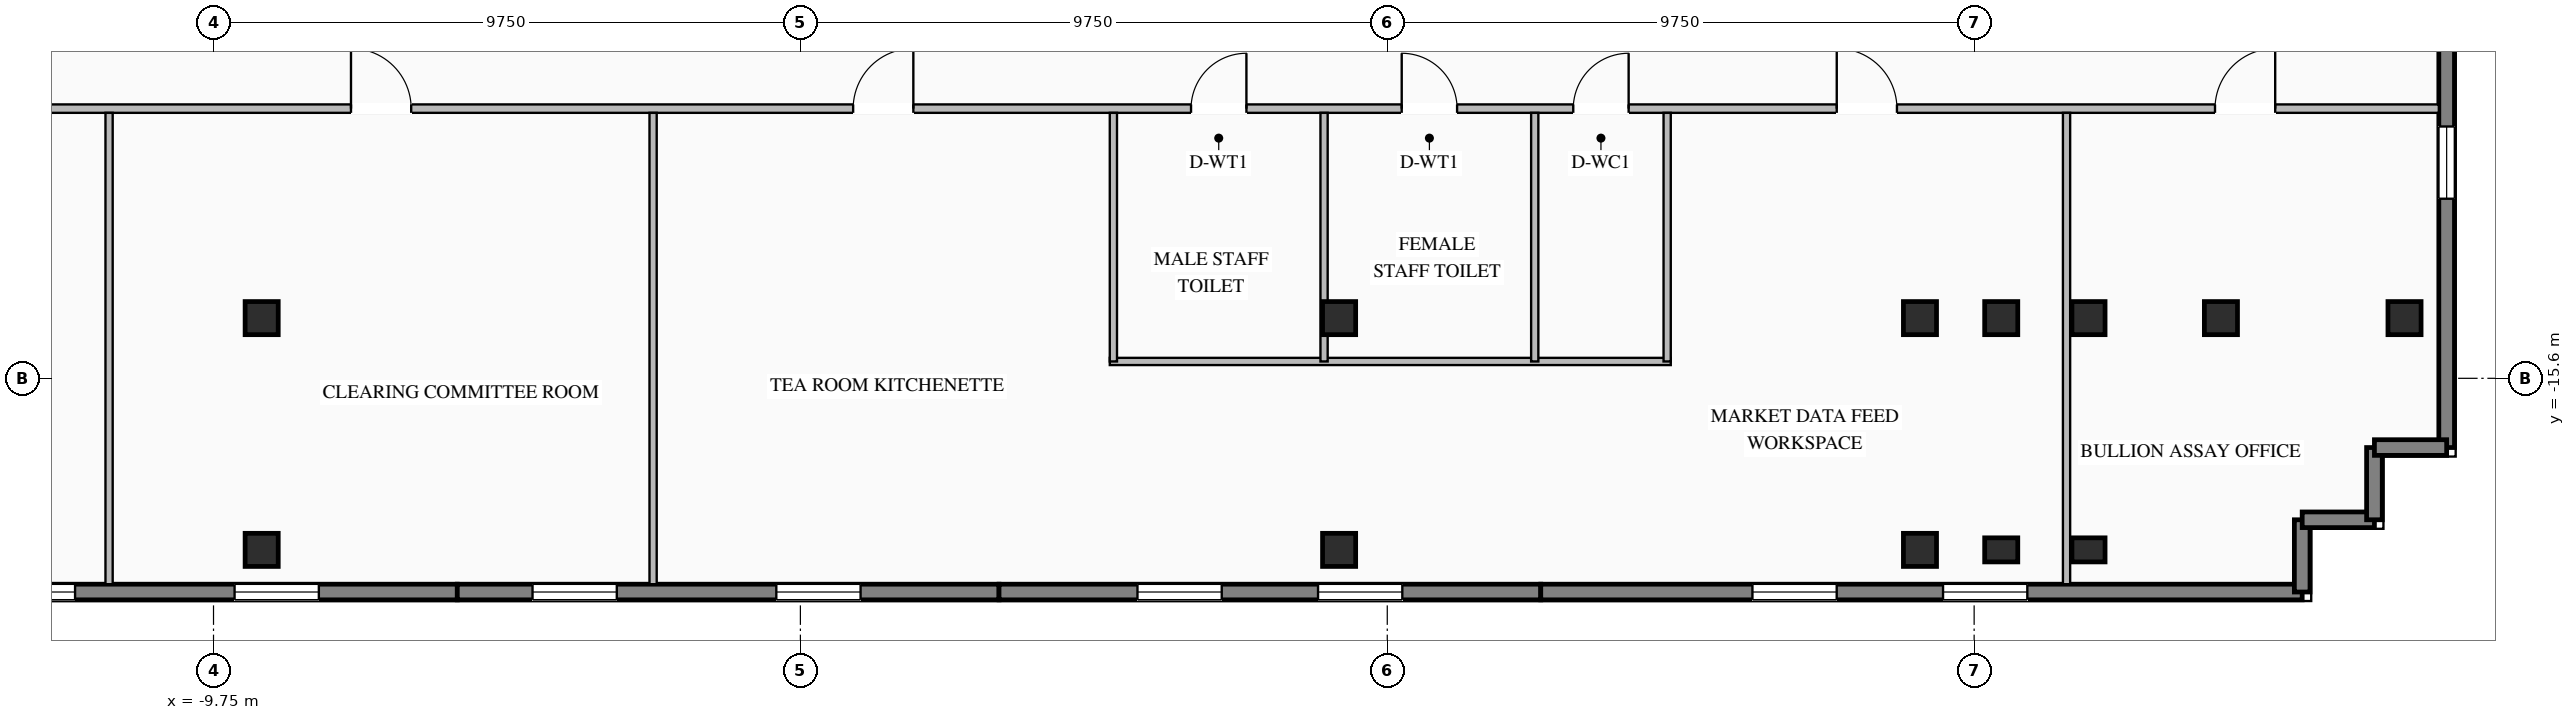
"""IFC4 building model, lengths in metres.
Left out: names, types, materials, properties, quantities, classifications, styles, units other than length and angle.
Written with IfcOpenShell. Run it as: python <this file> out.ifc"""

import sys

from ifc_helpers import new_model, si_unit, direction, frame, frame_2d, origin, origin_2d, place, context, subcontext, project, spatial, rectangle, i_section, extrude, element, fill, save


model = new_model("IFC4")
c1 = context("Model", 3, precision=1e-05, world=origin(), true_north=direction((0.0, 1.0)))
c2 = subcontext(c1, "Body", "Model", "MODEL_VIEW")
j1 = project(units=[si_unit("LENGTHUNIT", "METRE"), si_unit("PLANEANGLEUNIT", "RADIAN")], contexts=[c1])
p1 = place(None, origin())
s1 = spatial("IfcSite", under=j1, at=p1, CompositionType="ELEMENT")
p2 = place(p1, origin())
s2 = spatial("IfcBuilding", under=s1, at=p2, CompositionType="ELEMENT")
p3 = place(p2, frame((0.0, 0.0, 218.85)))
s3 = spatial("IfcBuildingStorey", under=s2, at=p3, CompositionType="ELEMENT", Elevation=218.85)
for number, where, z_axis, x_axis in (
    (1, (-8.95, -14.6, 0.0), (0.0, 0.0, 1.0), (1.0, 0.0, 0.0)),
    (2, (8.95, -14.6, 0.0), (0.0, 0.0, 1.0), (1.0, 0.0, 0.0)),
    (3, (18.6, -14.6, 0.0), (0.0, 0.0, 1.0), (1.0, 0.0, 0.0)),
    (4, (19.95, -14.6, 0.0), (0.0, 0.0, 1.0), (1.0, 0.0, 0.0)),
    (5, (21.4, -14.6, 0.0), (0.0, 0.0, 1.0), (1.0, 0.0, 0.0)),
    (6, (23.6, -14.6, 0.0), (0.0, 0.0, 1.0), (1.0, 0.0, 0.0)),
    (7, (-8.95, -18.45, 0.0), (0.0, 0.0, 1.0), (1.0, 0.0, 0.0)),
    (8, (8.95, -18.45, 0.0), (0.0, 0.0, 1.0), (1.0, 0.0, 0.0)),
    (9, (18.6, -18.45, 0.0), (0.0, 0.0, 1.0), (1.0, 0.0, 0.0)),
    (10, (26.65, -14.6, 0.0), (0.0, 0.0, 1.0), (1.0, 0.0, 0.0)),
):
    element("IfcColumn", number, at=place(p3, frame(where, z_axis=z_axis, x_axis=x_axis)), inside=s3, PredefinedType="COLUMN", context=c2, shape_type="SweptSolid", body=[
        extrude(i_section(OverallWidth=0.55, OverallDepth=0.55, WebThickness=0.024, FlangeThickness=0.036, at=origin_2d()), origin(), (0.0, 0.0, 1.0), 3.45),
    ])
for number, where, z_axis, x_axis in (
    (11, (19.95, -18.45, 0.0), (0.0, 0.0, 1.0), (1.0, 0.0, 0.0)),
    (12, (21.4, -18.45, 0.0), (0.0, 0.0, 1.0), (1.0, 0.0, 0.0)),
):
    element("IfcColumn", number, at=place(p3, frame(where, z_axis=z_axis, x_axis=x_axis)), inside=s3, PredefinedType="PILASTER", context=c2, shape_type="SweptSolid", body=[
        extrude(rectangle(XDim=0.55, YDim=0.4, at=origin_2d()), origin(), (0.0, 0.0, 1.0), 3.45),
    ])
p4 = place(p3, frame((-5.7, -19.15, 0.0), z_axis=(0.0, 0.0, 1.0), x_axis=(-1.0, 0.0, 0.0)))
e13 = element("IfcWall", 13, at=p4, inside=s3, PredefinedType="STANDARD", context=c2, shape_type="SweptSolid", body=[
    extrude(rectangle(XDim=9.0, YDim=0.26, at=frame_2d((4.5, 0.0))), origin(), (0.0, 0.0, 1.0), 3.25),
])
p5 = place(p4, frame((2.3, 0.0, 0.76)))
e14 = element("IfcOpeningElement", 14, at=p5, cuts=e13, PredefinedType="OPENING", context=c2, shape_type="SweptSolid", body=[
    extrude(rectangle(XDim=1.4, YDim=1.95, at=frame_2d((0.7, 0.975))), frame((0.0, 0.14, 0.0), z_axis=(0.0, -1.0, 0.0), x_axis=(1.0, 0.0, 0.0)), (0.0, 0.0, 1.0), 0.28),
])
p6 = place(p4, frame((6.35, 0.0, 0.76)))
e15 = element("IfcOpeningElement", 15, at=p6, cuts=e13, PredefinedType="OPENING", context=c2, shape_type="SweptSolid", body=[
    extrude(rectangle(XDim=1.4, YDim=1.95, at=frame_2d((0.7, 0.975))), frame((0.0, 0.14, 0.0), z_axis=(0.0, -1.0, 0.0), x_axis=(1.0, 0.0, 0.0)), (0.0, 0.0, 1.0), 0.28),
])
p7 = place(p3, frame((3.3, -19.15, 0.0), z_axis=(0.0, 0.0, 1.0), x_axis=(-1.0, 0.0, 0.0)))
e16 = element("IfcWall", 16, at=p7, inside=s3, PredefinedType="STANDARD", context=c2, shape_type="SweptSolid", body=[
    extrude(rectangle(XDim=9.0, YDim=0.26, at=frame_2d((4.5, 0.0))), origin(), (0.0, 0.0, 1.0), 3.25),
])
p8 = place(p7, frame((2.3, 0.0, 0.76)))
e17 = element("IfcOpeningElement", 17, at=p8, cuts=e16, PredefinedType="OPENING", context=c2, shape_type="SweptSolid", body=[
    extrude(rectangle(XDim=1.4, YDim=1.95, at=frame_2d((0.7, 0.975))), frame((0.0, 0.14, 0.0), z_axis=(0.0, -1.0, 0.0), x_axis=(1.0, 0.0, 0.0)), (0.0, 0.0, 1.0), 0.28),
])
p9 = place(p7, frame((6.35, 0.0, 0.76)))
e18 = element("IfcOpeningElement", 18, at=p9, cuts=e16, PredefinedType="OPENING", context=c2, shape_type="SweptSolid", body=[
    extrude(rectangle(XDim=1.4, YDim=1.95, at=frame_2d((0.7, 0.975))), frame((0.0, 0.14, 0.0), z_axis=(0.0, -1.0, 0.0), x_axis=(1.0, 0.0, 0.0)), (0.0, 0.0, 1.0), 0.28),
])
p10 = place(p3, frame((12.3, -19.15, 0.0), z_axis=(0.0, 0.0, 1.0), x_axis=(-1.0, 0.0, 0.0)))
e19 = element("IfcWall", 19, at=p10, inside=s3, PredefinedType="STANDARD", context=c2, shape_type="SweptSolid", body=[
    extrude(rectangle(XDim=9.0, YDim=0.26, at=frame_2d((4.5, 0.0))), origin(), (0.0, 0.0, 1.0), 3.25),
])
p11 = place(p10, frame((2.3, 0.0, 0.76)))
e20 = element("IfcOpeningElement", 20, at=p11, cuts=e19, PredefinedType="OPENING", context=c2, shape_type="SweptSolid", body=[
    extrude(rectangle(XDim=1.4, YDim=1.95, at=frame_2d((0.7, 0.975))), frame((0.0, 0.14, 0.0), z_axis=(0.0, -1.0, 0.0), x_axis=(1.0, 0.0, 0.0)), (0.0, 0.0, 1.0), 0.28),
])
p12 = place(p10, frame((5.3, 0.0, 0.76)))
e21 = element("IfcOpeningElement", 21, at=p12, cuts=e19, PredefinedType="OPENING", context=c2, shape_type="SweptSolid", body=[
    extrude(rectangle(XDim=1.4, YDim=1.95, at=frame_2d((0.7, 0.975))), frame((0.0, 0.14, 0.0), z_axis=(0.0, -1.0, 0.0), x_axis=(1.0, 0.0, 0.0)), (0.0, 0.0, 1.0), 0.28),
])
p13 = place(p3, frame((24.95, -19.15, 0.0), z_axis=(0.0, 0.0, 1.0), x_axis=(-1.0, 0.0, 0.0)))
e22 = element("IfcWall", 22, at=p13, inside=s3, PredefinedType="STANDARD", context=c2, shape_type="SweptSolid", body=[
    extrude(rectangle(XDim=12.65, YDim=0.26, at=frame_2d((6.325, 0.0))), origin(), (0.0, 0.0, 1.0), 3.25),
])
p14 = place(p13, frame((4.567, 0.0, 0.76)))
e23 = element("IfcOpeningElement", 23, at=p14, cuts=e22, PredefinedType="OPENING", context=c2, shape_type="SweptSolid", body=[
    extrude(rectangle(XDim=1.4, YDim=1.95, at=frame_2d((0.7, 0.975))), frame((0.0, 0.14, 0.0), z_axis=(0.0, -1.0, 0.0), x_axis=(1.0, 0.0, 0.0)), (0.0, 0.0, 1.0), 0.28),
])
p15 = place(p13, frame((7.733, 0.0, 0.76)))
e24 = element("IfcOpeningElement", 24, at=p15, cuts=e22, PredefinedType="OPENING", context=c2, shape_type="SweptSolid", body=[
    extrude(rectangle(XDim=1.4, YDim=1.95, at=frame_2d((0.7, 0.975))), frame((0.0, 0.14, 0.0), z_axis=(0.0, -1.0, 0.0), x_axis=(1.0, 0.0, 0.0)), (0.0, 0.0, 1.0), 0.28),
])
p16 = place(p3, frame((27.35, -0.9, 0.0), z_axis=(0.0, 0.0, 1.0), x_axis=(0.0, -1.0, 0.0)))
e25 = element("IfcWall", 25, at=p16, inside=s3, PredefinedType="STANDARD", context=c2, shape_type="SweptSolid", body=[
    extrude(rectangle(XDim=15.85, YDim=0.26, at=frame_2d((7.925, 0.0))), origin(), (0.0, 0.0, 1.0), 3.25),
])
p17 = place(p16, frame((4.683, 0.0, 0.76)))
e26 = element("IfcOpeningElement", 26, at=p17, cuts=e25, PredefinedType="OPENING", context=c2, shape_type="SweptSolid", body=[
    extrude(rectangle(XDim=1.2, YDim=1.95, at=frame_2d((0.6, 0.975))), frame((0.0, 0.14, 0.0), z_axis=(0.0, -1.0, 0.0), x_axis=(1.0, 0.0, 0.0)), (0.0, 0.0, 1.0), 0.28),
])
p18 = place(p16, frame((10.517, 0.0, 0.76)))
e27 = element("IfcOpeningElement", 27, at=p18, cuts=e25, PredefinedType="OPENING", context=c2, shape_type="SweptSolid", body=[
    extrude(rectangle(XDim=1.2, YDim=1.95, at=frame_2d((0.6, 0.975))), frame((0.0, 0.14, 0.0), z_axis=(0.0, -1.0, 0.0), x_axis=(1.0, 0.0, 0.0)), (0.0, 0.0, 1.0), 0.28),
])
for number, where, z_axis, x_axis in (
    (28, (24.95, -19.15, 0.0), (0.0, 0.0, 1.0), (0.0, 1.0, 0.0)),
    (29, (24.95, -17.95, 0.0), (0.0, 0.0, 1.0), (1.0, 0.0, 0.0)),
    (30, (26.15, -17.95, 0.0), (0.0, 0.0, 1.0), (0.0, 1.0, 0.0)),
):
    element("IfcWall", number, at=place(p3, frame(where, z_axis=z_axis, x_axis=x_axis)), inside=s3, PredefinedType="STANDARD", context=c2, shape_type="SweptSolid", body=[
        extrude(rectangle(XDim=1.2, YDim=0.26, at=frame_2d((0.6, 0.0))), origin(), (0.0, 0.0, 1.0), 3.25),
    ])
p19 = place(p3, frame((26.15, -16.75, 0.0), z_axis=(0.0, 0.0, 1.0), x_axis=(1.0, 0.0, 0.0)))
e31 = element("IfcWall", 31, at=p19, inside=s3, PredefinedType="STANDARD", context=c2, shape_type="SweptSolid", body=[
    extrude(rectangle(XDim=1.2, YDim=0.26, at=frame_2d((0.6, 0.0))), origin(), (0.0, 0.0, 1.0), 3.25),
])
p20 = place(p3, frame((-29.62, -11.12, 0.0), z_axis=(0.0, 0.0, 1.0), x_axis=(1.0, 0.0, 0.0)))
e32 = element("IfcWall", 32, at=p20, inside=s3, PredefinedType="STANDARD", context=c2, shape_type="SweptSolid", body=[
    extrude(rectangle(XDim=56.84, YDim=0.14, at=frame_2d((28.42, 0.0))), origin(), (0.0, 0.0, 1.0), 3.25),
])
p21 = place(p20, frame((36.11, 0.0, 0.0)))
e33 = element("IfcOpeningElement", 33, at=p21, cuts=e32, PredefinedType="OPENING", context=c2, shape_type="SweptSolid", body=[
    extrude(rectangle(XDim=0.92, YDim=2.08, at=frame_2d((0.46, 1.04))), frame((0.0, 0.08, 0.0), z_axis=(0.0, -1.0, 0.0), x_axis=(1.0, 0.0, 0.0)), (0.0, 0.0, 1.0), 0.16),
])
p22 = place(p20, frame((39.61, 0.0, 0.0)))
e34 = element("IfcOpeningElement", 34, at=p22, cuts=e32, PredefinedType="OPENING", context=c2, shape_type="SweptSolid", body=[
    extrude(rectangle(XDim=0.92, YDim=2.08, at=frame_2d((0.46, 1.04))), frame((0.0, 0.08, 0.0), z_axis=(0.0, -1.0, 0.0), x_axis=(1.0, 0.0, 0.0)), (0.0, 0.0, 1.0), 0.16),
])
p23 = place(p20, frame((42.46, 0.0, 0.0)))
e35 = element("IfcOpeningElement", 35, at=p23, cuts=e32, PredefinedType="OPENING", context=c2, shape_type="SweptSolid", body=[
    extrude(rectangle(XDim=0.92, YDim=2.08, at=frame_2d((0.46, 1.04))), frame((0.0, 0.08, 0.0), z_axis=(0.0, -1.0, 0.0), x_axis=(1.0, 0.0, 0.0)), (0.0, 0.0, 1.0), 0.16),
])
p24 = place(p20, frame((4.001, 0.0, 0.0)))
e36 = element("IfcOpeningElement", 36, at=p24, cuts=e32, PredefinedType="OPENING", context=c2, shape_type="SweptSolid", body=[
    extrude(rectangle(XDim=1.0, YDim=2.08, at=frame_2d((0.5, 1.04))), frame((0.0, 0.08, 0.0), z_axis=(0.0, -1.0, 0.0), x_axis=(1.0, 0.0, 0.0)), (0.0, 0.0, 1.0), 0.16),
])
p25 = place(p20, frame((12.942, 0.0, 0.0)))
e37 = element("IfcOpeningElement", 37, at=p25, cuts=e32, PredefinedType="OPENING", context=c2, shape_type="SweptSolid", body=[
    extrude(rectangle(XDim=1.0, YDim=2.08, at=frame_2d((0.5, 1.04))), frame((0.0, 0.08, 0.0), z_axis=(0.0, -1.0, 0.0), x_axis=(1.0, 0.0, 0.0)), (0.0, 0.0, 1.0), 0.16),
])
p26 = place(p20, frame((22.154, 0.0, 0.0)))
e38 = element("IfcOpeningElement", 38, at=p26, cuts=e32, PredefinedType="OPENING", context=c2, shape_type="SweptSolid", body=[
    extrude(rectangle(XDim=1.0, YDim=2.08, at=frame_2d((0.5, 1.04))), frame((0.0, 0.08, 0.0), z_axis=(0.0, -1.0, 0.0), x_axis=(1.0, 0.0, 0.0)), (0.0, 0.0, 1.0), 0.16),
])
p27 = place(p20, frame((30.497, 0.0, 0.0)))
e39 = element("IfcOpeningElement", 39, at=p27, cuts=e32, PredefinedType="OPENING", context=c2, shape_type="SweptSolid", body=[
    extrude(rectangle(XDim=1.0, YDim=2.08, at=frame_2d((0.5, 1.04))), frame((0.0, 0.08, 0.0), z_axis=(0.0, -1.0, 0.0), x_axis=(1.0, 0.0, 0.0)), (0.0, 0.0, 1.0), 0.16),
])
p28 = place(p20, frame((46.837, 0.0, 0.0)))
e40 = element("IfcOpeningElement", 40, at=p28, cuts=e32, PredefinedType="OPENING", context=c2, shape_type="SweptSolid", body=[
    extrude(rectangle(XDim=1.0, YDim=2.08, at=frame_2d((0.5, 1.04))), frame((0.0, 0.08, 0.0), z_axis=(0.0, -1.0, 0.0), x_axis=(1.0, 0.0, 0.0)), (0.0, 0.0, 1.0), 0.16),
])
p29 = place(p20, frame((53.122, 0.0, 0.0)))
e41 = element("IfcOpeningElement", 41, at=p29, cuts=e32, PredefinedType="OPENING", context=c2, shape_type="SweptSolid", body=[
    extrude(rectangle(XDim=1.0, YDim=2.08, at=frame_2d((0.5, 1.04))), frame((0.0, 0.08, 0.0), z_axis=(0.0, -1.0, 0.0), x_axis=(1.0, 0.0, 0.0)), (0.0, 0.0, 1.0), 0.16),
])
p30 = place(p3, frame((5.14, -15.32, 0.0), z_axis=(0.0, 0.0, 1.0), x_axis=(1.0, 0.0, 0.0)))
e42 = element("IfcWall", 42, at=p30, inside=s3, PredefinedType="STANDARD", context=c2, shape_type="SweptSolid", body=[
    extrude(rectangle(XDim=9.32, YDim=0.12, at=frame_2d((4.66, 0.0))), origin(), (0.0, 0.0, 1.0), 3.25),
])
for number, where, z_axis, x_axis in (
    (43, (5.2, -15.32, 0.0), (0.0, 0.0, 1.0), (0.0, 1.0, 0.0)),
    (44, (8.7, -15.32, 0.0), (0.0, 0.0, 1.0), (0.0, 1.0, 0.0)),
    (45, (12.2, -15.32, 0.0), (0.0, 0.0, 1.0), (0.0, 1.0, 0.0)),
    (46, (14.4, -15.32, 0.0), (0.0, 0.0, 1.0), (0.0, 1.0, 0.0)),
):
    element("IfcWall", number, at=place(p3, frame(where, z_axis=z_axis, x_axis=x_axis)), inside=s3, PredefinedType="STANDARD", context=c2, shape_type="SweptSolid", body=[
        extrude(rectangle(XDim=4.13, YDim=0.12, at=frame_2d((2.065, 0.0))), origin(), (0.0, 0.0, 1.0), 3.25),
    ])
for number, where, z_axis, x_axis in (
    (47, (-11.485, -19.02, 0.0), (0.0, 0.0, 1.0), (0.0, 1.0, 0.0)),
    (48, (-2.447, -19.02, 0.0), (0.0, 0.0, 1.0), (0.0, 1.0, 0.0)),
    (49, (21.035, -19.02, 0.0), (0.0, 0.0, 1.0), (0.0, 1.0, 0.0)),
):
    element("IfcWall", number, at=place(p3, frame(where, z_axis=z_axis, x_axis=x_axis)), inside=s3, PredefinedType="STANDARD", context=c2, shape_type="SweptSolid", body=[
        extrude(rectangle(XDim=7.83, YDim=0.12, at=frame_2d((3.915, 0.0))), origin(), (0.0, 0.0, 1.0), 3.25),
    ])
p31 = place(p5, origin())
e50 = element("IfcWindow", 50, at=p31, inside=s3, PartitioningType="SINGLE_PANEL", PredefinedType="WINDOW", context=c2, shape_type="SweptSolid", body=[
    extrude(rectangle(XDim=1.4, YDim=1.95, at=frame_2d((0.7, 0.975))), frame((0.0, 0.03, 0.0), z_axis=(0.0, -1.0, 0.0), x_axis=(1.0, 0.0, 0.0)), (0.0, 0.0, 1.0), 0.06),
])
fill(e14, e50)
p32 = place(p6, origin())
e51 = element("IfcWindow", 51, at=p32, inside=s3, PartitioningType="SINGLE_PANEL", PredefinedType="WINDOW", context=c2, shape_type="SweptSolid", body=[
    extrude(rectangle(XDim=1.4, YDim=1.95, at=frame_2d((0.7, 0.975))), frame((0.0, 0.03, 0.0), z_axis=(0.0, -1.0, 0.0), x_axis=(1.0, 0.0, 0.0)), (0.0, 0.0, 1.0), 0.06),
])
fill(e15, e51)
p33 = place(p8, origin())
e52 = element("IfcWindow", 52, at=p33, inside=s3, PartitioningType="SINGLE_PANEL", PredefinedType="WINDOW", context=c2, shape_type="SweptSolid", body=[
    extrude(rectangle(XDim=1.4, YDim=1.95, at=frame_2d((0.7, 0.975))), frame((0.0, 0.03, 0.0), z_axis=(0.0, -1.0, 0.0), x_axis=(1.0, 0.0, 0.0)), (0.0, 0.0, 1.0), 0.06),
])
fill(e17, e52)
p34 = place(p9, origin())
e53 = element("IfcWindow", 53, at=p34, inside=s3, PartitioningType="SINGLE_PANEL", PredefinedType="WINDOW", context=c2, shape_type="SweptSolid", body=[
    extrude(rectangle(XDim=1.4, YDim=1.95, at=frame_2d((0.7, 0.975))), frame((0.0, 0.03, 0.0), z_axis=(0.0, -1.0, 0.0), x_axis=(1.0, 0.0, 0.0)), (0.0, 0.0, 1.0), 0.06),
])
fill(e18, e53)
p35 = place(p11, origin())
e54 = element("IfcWindow", 54, at=p35, inside=s3, PartitioningType="SINGLE_PANEL", PredefinedType="WINDOW", context=c2, shape_type="SweptSolid", body=[
    extrude(rectangle(XDim=1.4, YDim=1.95, at=frame_2d((0.7, 0.975))), frame((0.0, 0.03, 0.0), z_axis=(0.0, -1.0, 0.0), x_axis=(1.0, 0.0, 0.0)), (0.0, 0.0, 1.0), 0.06),
])
fill(e20, e54)
p36 = place(p12, origin())
e55 = element("IfcWindow", 55, at=p36, inside=s3, PartitioningType="SINGLE_PANEL", PredefinedType="WINDOW", context=c2, shape_type="SweptSolid", body=[
    extrude(rectangle(XDim=1.4, YDim=1.95, at=frame_2d((0.7, 0.975))), frame((0.0, 0.03, 0.0), z_axis=(0.0, -1.0, 0.0), x_axis=(1.0, 0.0, 0.0)), (0.0, 0.0, 1.0), 0.06),
])
fill(e21, e55)
p37 = place(p14, origin())
e56 = element("IfcWindow", 56, at=p37, inside=s3, PartitioningType="SINGLE_PANEL", PredefinedType="WINDOW", context=c2, shape_type="SweptSolid", body=[
    extrude(rectangle(XDim=1.4, YDim=1.95, at=frame_2d((0.7, 0.975))), frame((0.0, 0.03, 0.0), z_axis=(0.0, -1.0, 0.0), x_axis=(1.0, 0.0, 0.0)), (0.0, 0.0, 1.0), 0.06),
])
fill(e23, e56)
p38 = place(p15, origin())
e57 = element("IfcWindow", 57, at=p38, inside=s3, PartitioningType="SINGLE_PANEL", PredefinedType="WINDOW", context=c2, shape_type="SweptSolid", body=[
    extrude(rectangle(XDim=1.4, YDim=1.95, at=frame_2d((0.7, 0.975))), frame((0.0, 0.03, 0.0), z_axis=(0.0, -1.0, 0.0), x_axis=(1.0, 0.0, 0.0)), (0.0, 0.0, 1.0), 0.06),
])
fill(e24, e57)
p39 = place(p18, origin())
e58 = element("IfcWindow", 58, at=p39, inside=s3, PartitioningType="SINGLE_PANEL", PredefinedType="WINDOW", context=c2, shape_type="SweptSolid", body=[
    extrude(rectangle(XDim=1.2, YDim=1.95, at=frame_2d((0.6, 0.975))), frame((0.0, 0.03, 0.0), z_axis=(0.0, -1.0, 0.0), x_axis=(1.0, 0.0, 0.0)), (0.0, 0.0, 1.0), 0.06),
])
fill(e27, e58)
p40 = place(p21, origin())
e59 = element("IfcDoor", 59, at=p40, inside=s3, OperationType="SINGLE_SWING_RIGHT", PredefinedType="DOOR", context=c2, shape_type="SweptSolid", body=[
    extrude(rectangle(XDim=0.92, YDim=2.08, at=frame_2d((0.46, 1.04))), frame((0.0, 0.025, 0.0), z_axis=(0.0, -1.0, 0.0), x_axis=(1.0, 0.0, 0.0)), (0.0, 0.0, 1.0), 0.05),
])
fill(e33, e59)
p41 = place(p22, origin())
e60 = element("IfcDoor", 60, at=p41, inside=s3, OperationType="SINGLE_SWING_LEFT", PredefinedType="DOOR", context=c2, shape_type="SweptSolid", body=[
    extrude(rectangle(XDim=0.92, YDim=2.08, at=frame_2d((0.46, 1.04))), frame((0.0, 0.025, 0.0), z_axis=(0.0, -1.0, 0.0), x_axis=(1.0, 0.0, 0.0)), (0.0, 0.0, 1.0), 0.05),
])
fill(e34, e60)
p42 = place(p23, origin())
e61 = element("IfcDoor", 61, at=p42, inside=s3, OperationType="SINGLE_SWING_RIGHT", PredefinedType="DOOR", context=c2, shape_type="SweptSolid", body=[
    extrude(rectangle(XDim=0.92, YDim=2.08, at=frame_2d((0.46, 1.04))), frame((0.0, 0.025, 0.0), z_axis=(0.0, -1.0, 0.0), x_axis=(1.0, 0.0, 0.0)), (0.0, 0.0, 1.0), 0.05),
])
fill(e35, e61)
p43 = place(p26, origin())
e62 = element("IfcDoor", 62, at=p43, inside=s3, OperationType="SINGLE_SWING_LEFT", PredefinedType="DOOR", context=c2, shape_type="SweptSolid", body=[
    extrude(rectangle(XDim=1.0, YDim=2.08, at=frame_2d((0.5, 1.04))), frame((0.0, 0.025, 0.0), z_axis=(0.0, -1.0, 0.0), x_axis=(1.0, 0.0, 0.0)), (0.0, 0.0, 1.0), 0.05),
])
fill(e38, e62)
p44 = place(p27, origin())
e63 = element("IfcDoor", 63, at=p44, inside=s3, OperationType="SINGLE_SWING_RIGHT", PredefinedType="DOOR", context=c2, shape_type="SweptSolid", body=[
    extrude(rectangle(XDim=1.0, YDim=2.08, at=frame_2d((0.5, 1.04))), frame((0.0, 0.025, 0.0), z_axis=(0.0, -1.0, 0.0), x_axis=(1.0, 0.0, 0.0)), (0.0, 0.0, 1.0), 0.05),
])
fill(e39, e63)
p45 = place(p28, origin())
e64 = element("IfcDoor", 64, at=p45, inside=s3, OperationType="SINGLE_SWING_LEFT", PredefinedType="DOOR", context=c2, shape_type="SweptSolid", body=[
    extrude(rectangle(XDim=1.0, YDim=2.08, at=frame_2d((0.5, 1.04))), frame((0.0, 0.025, 0.0), z_axis=(0.0, -1.0, 0.0), x_axis=(1.0, 0.0, 0.0)), (0.0, 0.0, 1.0), 0.05),
])
fill(e40, e64)
p46 = place(p29, origin())
e65 = element("IfcDoor", 65, at=p46, inside=s3, OperationType="SINGLE_SWING_RIGHT", PredefinedType="DOOR", context=c2, shape_type="SweptSolid", body=[
    extrude(rectangle(XDim=1.0, YDim=2.08, at=frame_2d((0.5, 1.04))), frame((0.0, 0.025, 0.0), z_axis=(0.0, -1.0, 0.0), x_axis=(1.0, 0.0, 0.0)), (0.0, 0.0, 1.0), 0.05),
])
fill(e41, e65)
save(model, sys.argv[1])
